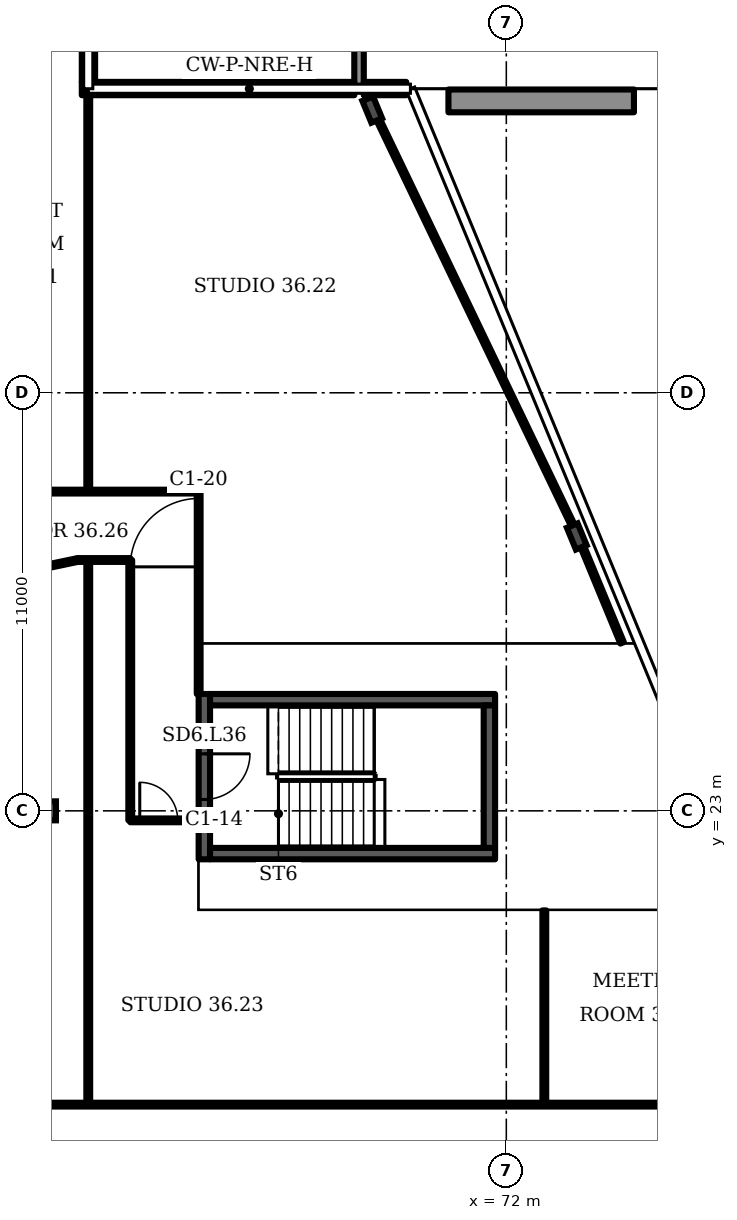
"""IFC4 building model, lengths in metres.
Left out: names, types, materials, properties, quantities, classifications, styles, units other than length and angle.
Written with IfcOpenShell. Run it as: python <this file> out.ifc"""

import sys

from ifc_helpers import new_model, si_unit, direction, frame, frame_2d, origin, origin_2d, place, context, subcontext, project, spatial, rectangle, i_section, extrude, element, fill, save


model = new_model("IFC4")
c1 = context("Model", 3, precision=1e-05, world=origin(), true_north=direction((0.0, 1.0)))
c2 = subcontext(c1, "Body", "Model", "MODEL_VIEW")
j1 = project(units=[si_unit("LENGTHUNIT", "METRE"), si_unit("PLANEANGLEUNIT", "RADIAN")], contexts=[c1])
p1 = place(None, origin())
s1 = spatial("IfcSite", under=j1, at=p1, CompositionType="ELEMENT")
p2 = place(p1, origin())
s2 = spatial("IfcBuilding", under=s1, at=p2, CompositionType="ELEMENT")
p3 = place(p2, frame((0.0, 0.0, 151.9)))
s3 = spatial("IfcBuildingStorey", under=s2, at=p3, CompositionType="ELEMENT", Elevation=151.9)
for number, where, z_axis, x_axis in (
    (1, (73.854, 30.219, 0.0), (0.0, 0.0, 1.0), (0.924, 0.382, 0.0)),
    (2, (68.472, 41.45, 0.0), (0.0, 0.0, 1.0), (0.924, 0.382, 0.0)),
):
    element("IfcColumn", number, at=place(p3, frame(where, z_axis=z_axis, x_axis=x_axis)), inside=s3, PredefinedType="COLUMN", context=c2, shape_type="SweptSolid", body=[
        extrude(i_section(OverallWidth=0.305, OverallDepth=0.62, WebThickness=0.021, FlangeThickness=0.04, FilletRadius=0.027, at=origin_2d()), origin(), (0.0, 0.0, 1.0), 3.6),
    ])
p4 = place(p3, frame((60.0, 23.0, 0.0), z_axis=(0.0, 0.0, 1.0), x_axis=(1.0, 0.0, 0.0)))
e3 = element("IfcColumn", 3, at=p4, inside=s3, PredefinedType="COLUMN", context=c2, shape_type="SweptSolid", body=[
    extrude(i_section(OverallWidth=0.3, OverallDepth=0.5, WebThickness=0.014, FlangeThickness=0.028, FilletRadius=0.027, at=origin_2d()), origin(), (0.0, 0.0, 1.0), 3.6),
])
p5 = place(p3, frame((68.125, 48.504, 0.0), z_axis=(0.0, 0.0, 1.0), x_axis=(0.0, -1.0, 0.0)))
e4 = element("IfcWall", 4, at=p5, inside=s3, PredefinedType="PARAPET", context=c2, shape_type="SweptSolid", body=[
    extrude(rectangle(XDim=6.504, YDim=0.25, at=frame_2d((3.252, 0.0))), origin(), (0.0, 0.0, 1.0), 1.1),
])
p6 = place(p3, frame((70.477, 41.68, 0.0), z_axis=(0.0, 0.0, 1.0), x_axis=(1.0, 0.0, 0.0)))
e5 = element("IfcWall", 5, at=p6, inside=s3, PredefinedType="SOLIDWALL", context=c2, shape_type="SweptSolid", body=[
    extrude(rectangle(XDim=4.881, YDim=0.6, at=frame_2d((2.44, 0.0))), origin(), (0.0, 0.0, 1.0), 0.8),
])
p7 = place(p3, frame((69.366, 42.005, 0.0), z_axis=(0.0, 0.0, 1.0), x_axis=(-1.0, 0.0, 0.0)))
e6 = element("IfcWall", 6, at=p7, inside=s3, PredefinedType="SOLIDWALL", context=c2, shape_type="SweptSolid", body=[
    extrude(rectangle(XDim=1.116, YDim=0.35, at=frame_2d((0.558, 0.0))), origin(), (0.0, 0.0, 1.0), 1.0),
])
p8 = place(p3, frame((68.0, 42.005, 0.0), z_axis=(0.0, 0.0, 1.0), x_axis=(-1.0, 0.0, 0.0)))
e7 = element("IfcWall", 7, at=p8, inside=s3, PredefinedType="SOLIDWALL", context=c2, shape_type="SweptSolid", body=[
    extrude(rectangle(XDim=7.17, YDim=0.35, at=frame_2d((3.585, 0.0))), origin(), (0.0, 0.0, 1.0), 1.0),
])
p9 = place(p3, frame((61.005, 42.18, 0.0), z_axis=(0.0, 0.0, 1.0), x_axis=(0.0, 1.0, 0.0)))
e8 = element("IfcWall", 8, at=p9, inside=s3, PredefinedType="SOLIDWALL", context=c2, shape_type="SweptSolid", body=[
    extrude(rectangle(XDim=1.97, YDim=0.35, at=frame_2d((0.985, 0.0))), origin(), (0.0, 0.0, 1.0), 1.0),
])
p10 = place(p3, frame((64.055, 21.725, 0.0), z_axis=(0.0, 0.0, 1.0), x_axis=(0.0, 1.0, 0.0)))
e9 = element("IfcWall", 9, at=p10, inside=s3, PredefinedType="SHEAR", context=c2, shape_type="SweptSolid", body=[
    extrude(rectangle(XDim=4.35, YDim=0.3, at=frame_2d((2.175, 0.0))), origin(), (0.0, 0.0, 1.0), 3.2),
])
p11 = place(p10, frame((1.575, 0.0, 0.0)))
e10 = element("IfcOpeningElement", 10, at=p11, cuts=e9, PredefinedType="OPENING", context=c2, shape_type="SweptSolid", body=[
    extrude(rectangle(XDim=1.2, YDim=2.1, at=frame_2d((0.6, 1.05))), frame((0.0, 0.16, 0.0), z_axis=(0.0, -1.0, 0.0), x_axis=(1.0, 0.0, 0.0)), (0.0, 0.0, 1.0), 0.32),
])
p12 = place(p3, frame((18.2, 15.27, 0.0), z_axis=(0.0, 0.0, 1.0), x_axis=(1.0, 0.0, 0.0)))
e11 = element("IfcWall", 11, at=p12, inside=s3, PredefinedType="PARTITIONING", context=c2, shape_type="SweptSolid", body=[
    extrude(rectangle(XDim=62.291, YDim=0.1, at=frame_2d((31.146, 0.0))), origin(), (0.0, 0.0, 1.0), 2.58),
])
p13 = place(p12, frame((0.38, 0.0, 0.0)))
e12 = element("IfcOpeningElement", 12, at=p13, cuts=e11, PredefinedType="OPENING", context=c2, shape_type="SweptSolid", body=[
    extrude(rectangle(XDim=1.0, YDim=2.1, at=frame_2d((0.5, 1.05))), frame((0.0, 0.06, 0.0), z_axis=(0.0, -1.0, 0.0), x_axis=(1.0, 0.0, 0.0)), (0.0, 0.0, 1.0), 0.12),
])
p14 = place(p12, frame((58.102, 0.0, 0.0)))
e13 = element("IfcOpeningElement", 13, at=p14, cuts=e11, PredefinedType="OPENING", context=c2, shape_type="SweptSolid", body=[
    extrude(rectangle(XDim=1.0, YDim=2.1, at=frame_2d((0.5, 1.05))), frame((0.0, 0.06, 0.0), z_axis=(0.0, -1.0, 0.0), x_axis=(1.0, 0.0, 0.0)), (0.0, 0.0, 1.0), 0.12),
])
p15 = place(p3, frame((58.0, 31.4, 0.0), z_axis=(0.0, 0.0, 1.0), x_axis=(1.0, 0.0, 0.0)))
e14 = element("IfcWall", 14, at=p15, inside=s3, PredefinedType="PARTITIONING", context=c2, shape_type="SweptSolid", body=[
    extrude(rectangle(XDim=5.905, YDim=0.1, at=frame_2d((2.953, 0.0))), origin(), (0.0, 0.0, 1.0), 3.2),
])
p16 = place(p3, frame((59.79, 29.405, 0.0), z_axis=(0.0, 0.0, 1.0), x_axis=(0.978703, 0.205299, 0.0)))
e15 = element("IfcWall", 15, at=p16, inside=s3, PredefinedType="PARTITIONING", context=c2, shape_type="SweptSolid", body=[
    extrude(rectangle(XDim=0.95, YDim=0.1, at=frame_2d((0.475, 0.0))), origin(), (0.0, 0.0, 1.0), 3.2),
])
p17 = place(p3, frame((60.72, 29.6, 0.0), z_axis=(0.0, 0.0, 1.0), x_axis=(1.0, 0.0, 0.0)))
e16 = element("IfcWall", 16, at=p17, inside=s3, PredefinedType="PARTITIONING", context=c2, shape_type="SweptSolid", body=[
    extrude(rectangle(XDim=1.385, YDim=0.1, at=frame_2d((0.692, 0.0))), origin(), (0.0, 0.0, 1.0), 3.2),
])
p18 = place(p3, frame((61.0, 15.27, 0.0), z_axis=(0.0, 0.0, 1.0), x_axis=(0.0, 1.0, 0.0)))
e17 = element("IfcWall", 17, at=p18, inside=s3, PredefinedType="PARTITIONING", context=c2, shape_type="SweptSolid", body=[
    extrude(rectangle(XDim=14.33, YDim=0.1, at=frame_2d((7.165, 0.0))), origin(), (0.0, 0.0, 1.0), 3.2),
])
p19 = place(p3, frame((61.0, 31.4, 0.0), z_axis=(0.0, 0.0, 1.0), x_axis=(0.0, 1.0, 0.0)))
e18 = element("IfcWall", 18, at=p19, inside=s3, PredefinedType="PARTITIONING", context=c2, shape_type="SweptSolid", body=[
    extrude(rectangle(XDim=10.58, YDim=0.1, at=frame_2d((5.29, 0.0))), origin(), (0.0, 0.0, 1.0), 3.2),
])
p20 = place(p3, frame((62.105, 22.75, 0.0), z_axis=(0.0, 0.0, 1.0), x_axis=(0.0, 1.0, 0.0)))
e19 = element("IfcWall", 19, at=p20, inside=s3, PredefinedType="PARTITIONING", context=c2, shape_type="SweptSolid", body=[
    extrude(rectangle(XDim=6.85, YDim=0.1, at=frame_2d((3.425, 0.0))), origin(), (0.0, 0.0, 1.0), 3.2),
])
p21 = place(p3, frame((62.105, 22.75, 0.0), z_axis=(0.0, 0.0, 1.0), x_axis=(1.0, 0.0, 0.0)))
e20 = element("IfcWall", 20, at=p21, inside=s3, PredefinedType="PARTITIONING", context=c2, shape_type="SweptSolid", body=[
    extrude(rectangle(XDim=1.78, YDim=0.1, at=frame_2d((0.89, 0.0))), origin(), (0.0, 0.0, 1.0), 3.2),
])
p22 = place(p21, frame((0.25, 0.0, 0.0)))
e21 = element("IfcOpeningElement", 21, at=p22, cuts=e20, PredefinedType="OPENING", context=c2, shape_type="SweptSolid", body=[
    extrude(rectangle(XDim=1.0, YDim=2.1, at=frame_2d((0.5, 1.05))), frame((0.0, 0.06, 0.0), z_axis=(0.0, -1.0, 0.0), x_axis=(1.0, 0.0, 0.0)), (0.0, 0.0, 1.0), 0.12),
])
p23 = place(p3, frame((63.905, 26.075, 0.0), z_axis=(0.0, 0.0, 1.0), x_axis=(0.0, 1.0, 0.0)))
e22 = element("IfcWall", 22, at=p23, inside=s3, PredefinedType="PARTITIONING", context=c2, shape_type="SweptSolid", body=[
    extrude(rectangle(XDim=5.325, YDim=0.1, at=frame_2d((2.663, 0.0))), origin(), (0.0, 0.0, 1.0), 3.2),
])
p24 = place(p23, frame((3.345, 0.0, 0.0)))
e23 = element("IfcOpeningElement", 23, at=p24, cuts=e22, PredefinedType="OPENING", context=c2, shape_type="SweptSolid", body=[
    extrude(rectangle(XDim=1.8, YDim=2.1, at=frame_2d((0.9, 1.05))), frame((0.0, 0.06, 0.0), z_axis=(0.0, -1.0, 0.0), x_axis=(1.0, 0.0, 0.0)), (0.0, 0.0, 1.0), 0.12),
])
p25 = place(p3, frame((73.0, 15.27, 0.0), z_axis=(0.0, 0.0, 1.0), x_axis=(0.0, 1.0, 0.0)))
e24 = element("IfcWall", 24, at=p25, inside=s3, PredefinedType="PARTITIONING", context=c2, shape_type="SweptSolid", body=[
    extrude(rectangle(XDim=5.11, YDim=0.1, at=frame_2d((2.555, 0.0))), origin(), (0.0, 0.0, 1.0), 3.2),
])
p26 = place(p3, frame((73.885, 30.23, 0.0), z_axis=(0.0, 0.0, 1.0), x_axis=(-0.432489, 0.901635, 0.0)))
e25 = element("IfcWall", 25, at=p26, inside=s3, PredefinedType="PARTITIONING", context=c2, shape_type="SweptSolid", body=[
    extrude(rectangle(XDim=13.067, YDim=0.1, at=frame_2d((6.534, 0.0))), origin(), (0.0, 0.0, 1.0), 2.58),
])
p27 = place(p3, frame((75.047, 27.42, 0.0), z_axis=(0.0, 0.0, 1.0), x_axis=(-0.382024, 0.924148, 0.0)))
e26 = element("IfcWall", 26, at=p27, inside=s3, PredefinedType="PARTITIONING", context=c2, shape_type="SweptSolid", body=[
    extrude(rectangle(XDim=3.041, YDim=0.1, at=frame_2d((1.521, 0.0))), origin(), (0.0, 0.0, 1.0), 2.58),
])
for number, where, z_axis, x_axis in (
    (27, (64.205, 21.875, 0.0), (0.0, 0.0, 1.0), (1.0, 0.0, 0.0)),
    (28, (64.205, 25.925, 0.0), (0.0, 0.0, 1.0), (1.0, 0.0, 0.0)),
):
    element("IfcWall", number, at=place(p3, frame(where, z_axis=z_axis, x_axis=x_axis)), inside=s3, PredefinedType="SHEAR", context=c2, shape_type="SweptSolid", body=[
        extrude(rectangle(XDim=7.5, YDim=0.3, at=frame_2d((3.75, 0.0))), origin(), (0.0, 0.0, 1.0), 3.2),
    ])
p28 = place(p3, frame((71.555, 22.025, 0.0), z_axis=(0.0, 0.0, 1.0), x_axis=(0.0, 1.0, 0.0)))
e29 = element("IfcWall", 29, at=p28, inside=s3, PredefinedType="SHEAR", context=c2, shape_type="SweptSolid", body=[
    extrude(rectangle(XDim=3.75, YDim=0.3, at=frame_2d((1.875, 0.0))), origin(), (0.0, 0.0, 1.0), 3.2),
])
p29 = place(p11, origin())
e30 = element("IfcDoor", 30, at=p29, inside=s3, OperationType="SINGLE_SWING_RIGHT", PredefinedType="DOOR", context=c2, shape_type="SweptSolid", body=[
    extrude(rectangle(XDim=1.2, YDim=2.1, at=frame_2d((0.6, 1.05))), frame((0.0, 0.025, 0.0), z_axis=(0.0, -1.0, 0.0), x_axis=(1.0, 0.0, 0.0)), (0.0, 0.0, 1.0), 0.05),
])
fill(e10, e30)
p30 = place(p22, origin())
e31 = element("IfcDoor", 31, at=p30, inside=s3, OperationType="SINGLE_SWING_LEFT", PredefinedType="DOOR", context=c2, shape_type="SweptSolid", body=[
    extrude(rectangle(XDim=1.0, YDim=2.1, at=frame_2d((0.5, 1.05))), frame((0.0, 0.025, 0.0), z_axis=(0.0, -1.0, 0.0), x_axis=(1.0, 0.0, 0.0)), (0.0, 0.0, 1.0), 0.05),
])
fill(e21, e31)
p31 = place(p24, origin())
e32 = element("IfcDoor", 32, at=p31, inside=s3, OperationType="DOUBLE_DOOR_SINGLE_SWING", PredefinedType="DOOR", context=c2, shape_type="SweptSolid", body=[
    extrude(rectangle(XDim=1.8, YDim=2.1, at=frame_2d((0.9, 1.05))), frame((0.0, 0.025, 0.0), z_axis=(0.0, -1.0, 0.0), x_axis=(1.0, 0.0, 0.0)), (0.0, 0.0, 1.0), 0.05),
])
fill(e23, e32)
save(model, sys.argv[1])
